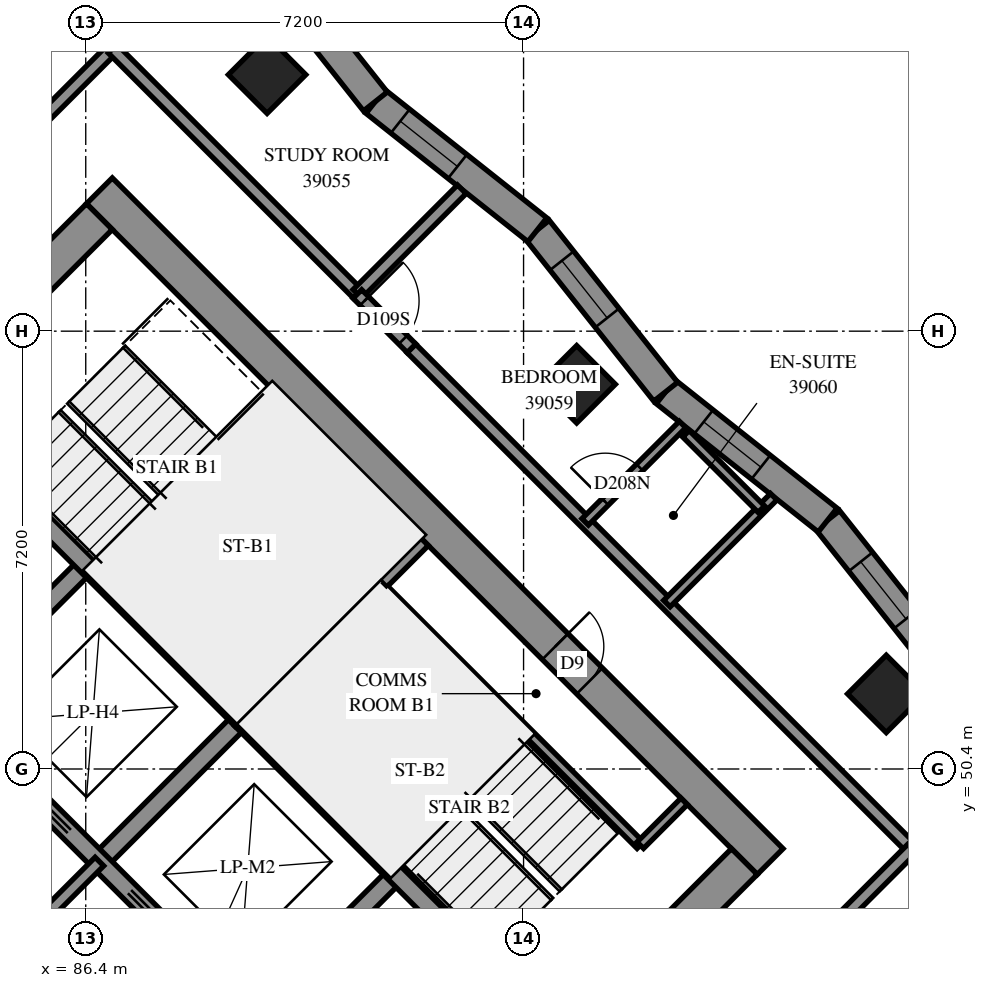
"""IFC4 building model, lengths in metres.
Left out: names, types, materials, properties, quantities, classifications, styles, units other than length and angle.
Written with IfcOpenShell. Run it as: python <this file> out.ifc"""

import sys

from ifc_helpers import new_model, si_unit, direction, frame, frame_2d, origin, origin_2d, place, context, subcontext, project, spatial, polyline, rectangle, outline, extrude, element, fill, save


model = new_model("IFC4")
c1 = context("Model", 3, precision=1e-05, world=origin(), true_north=direction((0.0, 1.0)))
c2 = subcontext(c1, "Body", "Model", "MODEL_VIEW")
j1 = project(units=[si_unit("LENGTHUNIT", "METRE"), si_unit("PLANEANGLEUNIT", "RADIAN")], contexts=[c1])
p1 = place(None, origin())
s1 = spatial("IfcSite", under=j1, at=p1, CompositionType="ELEMENT")
p2 = place(p1, origin())
s2 = spatial("IfcBuilding", under=s1, at=p2, CompositionType="ELEMENT")
p3 = place(p2, frame((0.0, 0.0, 145.6)))
s3 = spatial("IfcBuildingStorey", under=s2, at=p3, CompositionType="ELEMENT", Elevation=145.6)
for number, where, z_axis, x_axis in (
    (1, (89.382, 61.818, 0.0), (0.0, 0.0, 1.0), (0.707, -0.707, 0.0)),
    (2, (94.474, 56.727, 0.0), (0.0, 0.0, 1.0), (0.707, -0.707, 0.0)),
    (3, (99.565, 51.635, 0.0), (0.0, 0.0, 1.0), (0.707, -0.707, 0.0)),
):
    element("IfcColumn", number, at=place(p3, frame(where, z_axis=z_axis, x_axis=x_axis)), inside=s3, PredefinedType="COLUMN", context=c2, shape_type="SweptSolid", body=[
        extrude(rectangle(XDim=0.9, YDim=0.9, at=origin_2d()), origin(), (0.0, 0.0, 1.0), 3.1),
    ])
p4 = place(p3, frame((76.018, 49.302, -0.3), z_axis=(0.0, 0.0, 1.0), x_axis=(0.7071067812, -0.7071067812, 0.0)))
e4 = element("IfcWall", 4, at=p4, inside=s3, PredefinedType="SHEAR", context=c2, shape_type="SweptSolid", body=[
    extrude(rectangle(XDim=15.6, YDim=0.6, at=frame_2d((7.8, 0.0))), origin(), (0.0, 0.0, 1.0), 2.7),
])
p5 = place(p3, frame((86.625, 59.908, -0.3), z_axis=(0.0, 0.0, 1.0), x_axis=(0.7071067812, -0.7071067812, 0.0)))
e5 = element("IfcWall", 5, at=p5, inside=s3, PredefinedType="SHEAR", context=c2, shape_type="SweptSolid", body=[
    extrude(rectangle(XDim=15.6, YDim=0.6, at=frame_2d((7.8, 0.0))), origin(), (0.0, 0.0, 1.0), 2.7),
])
p6 = place(p5, frame((10.6, 0.0, 0.3)))
e6 = element("IfcOpeningElement", 6, at=p6, cuts=e5, PredefinedType="OPENING", context=c2, shape_type="SweptSolid", body=[
    extrude(rectangle(XDim=0.8, YDim=2.1, at=frame_2d((0.4, 1.05))), frame((0.0, 0.31, 0.0), z_axis=(0.0, -1.0, 0.0), x_axis=(1.0, 0.0, 0.0)), (0.0, 0.0, 1.0), 0.62),
])
p7 = place(p3, frame((76.442, 49.302, -0.3), z_axis=(0.0, 0.0, 1.0), x_axis=(0.7071067812, 0.7071067812, 0.0)))
e7 = element("IfcWall", 7, at=p7, inside=s3, PredefinedType="SHEAR", context=c2, shape_type="SweptSolid", body=[
    extrude(rectangle(XDim=14.4, YDim=0.6, at=frame_2d((7.2, 0.0))), origin(), (0.0, 0.0, 1.0), 2.7),
])
p8 = place(p7, frame((4.55, 0.0, 0.3)))
e8 = element("IfcOpeningElement", 8, at=p8, cuts=e7, PredefinedType="OPENING", context=c2, shape_type="SweptSolid", body=[
    extrude(rectangle(XDim=1.1, YDim=2.1, at=frame_2d((0.55, 1.05))), frame((0.0, 0.31, 0.0), z_axis=(0.0, -1.0, 0.0), x_axis=(1.0, 0.0, 0.0)), (0.0, 0.0, 1.0), 0.62),
])
p9 = place(p7, frame((11.35, 0.0, 0.3)))
e9 = element("IfcOpeningElement", 9, at=p9, cuts=e7, PredefinedType="OPENING", context=c2, shape_type="SweptSolid", body=[
    extrude(rectangle(XDim=1.1, YDim=2.1, at=frame_2d((0.55, 1.05))), frame((0.0, 0.31, 0.0), z_axis=(0.0, -1.0, 0.0), x_axis=(1.0, 0.0, 0.0)), (0.0, 0.0, 1.0), 0.62),
])
p10 = place(p3, frame((87.049, 38.695, -0.3), z_axis=(0.0, 0.0, 1.0), x_axis=(0.7071067812, 0.7071067812, 0.0)))
e10 = element("IfcWall", 10, at=p10, inside=s3, PredefinedType="SHEAR", context=c2, shape_type="SweptSolid", body=[
    extrude(rectangle(XDim=14.4, YDim=0.6, at=frame_2d((7.2, 0.0))), origin(), (0.0, 0.0, 1.0), 2.7),
])
p11 = place(p10, frame((4.55, 0.0, 0.3)))
e11 = element("IfcOpeningElement", 11, at=p11, cuts=e10, PredefinedType="OPENING", context=c2, shape_type="SweptSolid", body=[
    extrude(rectangle(XDim=1.1, YDim=2.1, at=frame_2d((0.55, 1.05))), frame((0.0, 0.31, 0.0), z_axis=(0.0, -1.0, 0.0), x_axis=(1.0, 0.0, 0.0)), (0.0, 0.0, 1.0), 0.62),
])
p12 = place(p10, frame((11.35, 0.0, 0.3)))
e12 = element("IfcOpeningElement", 12, at=p12, cuts=e10, PredefinedType="OPENING", context=c2, shape_type="SweptSolid", body=[
    extrude(rectangle(XDim=1.1, YDim=2.1, at=frame_2d((0.55, 1.05))), frame((0.0, 0.31, 0.0), z_axis=(0.0, -1.0, 0.0), x_axis=(1.0, 0.0, 0.0)), (0.0, 0.0, 1.0), 0.62),
])
p13 = place(p3, frame((84.079, 51.423, 0.0), z_axis=(0.0, 0.0, 1.0), x_axis=(0.7071219326, 0.7070916295, 0.0)))
e13 = element("IfcWall", 13, at=p13, inside=s3, PredefinedType="SOLIDWALL", context=c2, shape_type="SweptSolid", body=[
    extrude(rectangle(XDim=3.3, YDim=0.3, at=frame_2d((1.65, 0.0))), origin(), (0.0, 0.0, 1.0), 3.1),
])
for number, where, z_axis, x_axis in (
    (14, (86.625, 48.878, 0.0), (0.0, 0.0, 1.0), (0.707, 0.707, 0.0)),
    (15, (89.17, 46.332, 0.0), (0.0, 0.0, 1.0), (0.707, 0.707, 0.0)),
):
    element("IfcWall", number, at=place(p3, frame(where, z_axis=z_axis, x_axis=x_axis)), inside=s3, PredefinedType="SOLIDWALL", context=c2, shape_type="SweptSolid", body=[
        extrude(rectangle(XDim=3.3, YDim=0.3, at=frame_2d((1.65, 0.0))), origin(), (0.0, 0.0, 1.0), 3.1),
    ])
p14 = place(p3, frame((78.988, 51.423, 0.0), z_axis=(0.0, 0.0, 1.0), x_axis=(0.7071067812, -0.7071067812, 0.0)))
e16 = element("IfcWall", 16, at=p14, inside=s3, PredefinedType="SOLIDWALL", context=c2, shape_type="SweptSolid", body=[
    extrude(rectangle(XDim=14.4, YDim=0.3, at=frame_2d((7.2, 0.0))), origin(), (0.0, 0.0, 1.0), 3.1),
])
p15 = place(p14, frame((1.35, 0.0, 0.0)))
e17 = element("IfcOpeningElement", 17, at=p15, cuts=e16, PredefinedType="OPENING", context=c2, shape_type="SweptSolid", body=[
    extrude(rectangle(XDim=0.9, YDim=2.1, at=frame_2d((0.45, 1.05))), frame((0.0, 0.16, 0.0), z_axis=(0.0, -1.0, 0.0), x_axis=(1.0, 0.0, 0.0)), (0.0, 0.0, 1.0), 0.32),
])
p16 = place(p14, frame((4.95, 0.0, 0.0)))
e18 = element("IfcOpeningElement", 18, at=p16, cuts=e16, PredefinedType="OPENING", context=c2, shape_type="SweptSolid", body=[
    extrude(rectangle(XDim=0.9, YDim=2.1, at=frame_2d((0.45, 1.05))), frame((0.0, 0.16, 0.0), z_axis=(0.0, -1.0, 0.0), x_axis=(1.0, 0.0, 0.0)), (0.0, 0.0, 1.0), 0.32),
])
p17 = place(p14, frame((8.55, 0.0, 0.0)))
e19 = element("IfcOpeningElement", 19, at=p17, cuts=e16, PredefinedType="OPENING", context=c2, shape_type="SweptSolid", body=[
    extrude(rectangle(XDim=0.9, YDim=2.1, at=frame_2d((0.45, 1.05))), frame((0.0, 0.16, 0.0), z_axis=(0.0, -1.0, 0.0), x_axis=(1.0, 0.0, 0.0)), (0.0, 0.0, 1.0), 0.32),
])
p18 = place(p14, frame((12.05, 0.0, 0.0)))
e20 = element("IfcOpeningElement", 20, at=p18, cuts=e16, PredefinedType="OPENING", context=c2, shape_type="SweptSolid", body=[
    extrude(rectangle(XDim=1.1, YDim=2.1, at=frame_2d((0.55, 1.05))), frame((0.0, 0.16, 0.0), z_axis=(0.0, -1.0, 0.0), x_axis=(1.0, 0.0, 0.0)), (0.0, 0.0, 1.0), 0.32),
])
p19 = place(p3, frame((81.534, 53.969, 0.0), z_axis=(0.0, 0.0, 1.0), x_axis=(0.707103309, -0.7071102534, 0.0)))
e21 = element("IfcWall", 21, at=p19, inside=s3, PredefinedType="SOLIDWALL", context=c2, shape_type="SweptSolid", body=[
    extrude(rectangle(XDim=14.4, YDim=0.3, at=frame_2d((7.2, 0.0))), origin(), (0.0, 0.0, 1.0), 3.1),
])
p20 = place(p19, frame((1.25, 0.0, 0.0)))
e22 = element("IfcOpeningElement", 22, at=p20, cuts=e21, PredefinedType="OPENING", context=c2, shape_type="SweptSolid", body=[
    extrude(rectangle(XDim=1.1, YDim=2.1, at=frame_2d((0.55, 1.05))), frame((0.0, 0.16, 0.0), z_axis=(0.0, -1.0, 0.0), x_axis=(1.0, 0.0, 0.0)), (0.0, 0.0, 1.0), 0.32),
])
p21 = place(p19, frame((4.85, 0.0, 0.0)))
e23 = element("IfcOpeningElement", 23, at=p21, cuts=e21, PredefinedType="OPENING", context=c2, shape_type="SweptSolid", body=[
    extrude(rectangle(XDim=1.1, YDim=2.1, at=frame_2d((0.55, 1.05))), frame((0.0, 0.16, 0.0), z_axis=(0.0, -1.0, 0.0), x_axis=(1.0, 0.0, 0.0)), (0.0, 0.0, 1.0), 0.32),
])
p22 = place(p19, frame((8.45, 0.0, 0.0)))
e24 = element("IfcOpeningElement", 24, at=p22, cuts=e21, PredefinedType="OPENING", context=c2, shape_type="SweptSolid", body=[
    extrude(rectangle(XDim=1.1, YDim=2.1, at=frame_2d((0.55, 1.05))), frame((0.0, 0.16, 0.0), z_axis=(0.0, -1.0, 0.0), x_axis=(1.0, 0.0, 0.0)), (0.0, 0.0, 1.0), 0.32),
])
p23 = place(p19, frame((12.05, 0.0, 0.0)))
e25 = element("IfcOpeningElement", 25, at=p23, cuts=e21, PredefinedType="OPENING", context=c2, shape_type="SweptSolid", body=[
    extrude(rectangle(XDim=1.1, YDim=2.1, at=frame_2d((0.55, 1.05))), frame((0.0, 0.16, 0.0), z_axis=(0.0, -1.0, 0.0), x_axis=(1.0, 0.0, 0.0)), (0.0, 0.0, 1.0), 0.32),
])
for number, where, z_axis, x_axis in (
    (26, (83.867, 56.302, 0.0), (0.0, 0.0, 1.0), (0.707, -0.707, 0.0)),
    (27, (88.958, 51.211, 0.0), (0.0, 0.0, 1.0), (0.707, -0.707, 0.0)),
):
    element("IfcWall", number, at=place(p3, frame(where, z_axis=z_axis, x_axis=x_axis)), inside=s3, PredefinedType="SOLIDWALL", context=c2, shape_type="SweptSolid", body=[
        extrude(rectangle(XDim=7.2, YDim=0.3, at=frame_2d((3.6, 0.0))), origin(), (0.0, 0.0, 1.0), 3.1),
    ])
p24 = place(p3, frame((88.958, 51.211, 0.0), z_axis=(0.0, 0.0, 1.0), x_axis=(0.7071067812, 0.7071067812, 0.0)))
e28 = element("IfcWall", 28, at=p24, inside=s3, PredefinedType="SOLIDWALL", context=c2, shape_type="SweptSolid", body=[
    extrude(rectangle(XDim=4.2, YDim=0.3, at=frame_2d((2.1, 0.0))), origin(), (0.0, 0.0, 1.0), 3.1),
])
p25 = place(p3, frame((100.711, 51.83, 0.0), z_axis=(0.0, 0.0, 1.0), x_axis=(-0.6210601514, 0.7837629032, 0.0)))
e29 = element("IfcWall", 29, at=p25, inside=s3, PredefinedType="SOLIDWALL", context=c2, shape_type="SweptSolid", body=[
    extrude(outline(polyline([(0.029, -0.25), (3.427, -0.25), (3.369, 0.25), (-0.029, 0.25), (0.029, -0.25)])), origin(), (0.0, 0.0, 1.0), 3.1),
])
p26 = place(p25, frame((1.323, 0.0, 0.45)))
e30 = element("IfcOpeningElement", 30, at=p26, cuts=e29, PredefinedType="OPENING", context=c2, shape_type="SweptSolid", body=[
    extrude(rectangle(XDim=1.2, YDim=2.5, at=frame_2d((0.6, 1.25))), frame((0.0, 0.26, 0.0), z_axis=(0.0, -1.0, 0.0), x_axis=(1.0, 0.0, 0.0)), (0.0, 0.0, 1.0), 0.52),
])
p27 = place(p3, frame((98.601, 54.493, 0.0), z_axis=(0.0, 0.0, 1.0), x_axis=(-0.7837629032, 0.6210601514, 0.0)))
e31 = element("IfcWall", 31, at=p27, inside=s3, PredefinedType="SOLIDWALL", context=c2, shape_type="SweptSolid", body=[
    extrude(outline(polyline([(-0.029, -0.25), (3.369, -0.25), (3.427, 0.25), (0.029, 0.25), (-0.029, -0.25)])), origin(), (0.0, 0.0, 1.0), 3.1),
])
p28 = place(p27, frame((1.401, 0.0, 0.45)))
e32 = element("IfcOpeningElement", 32, at=p28, cuts=e31, PredefinedType="OPENING", context=c2, shape_type="SweptSolid", body=[
    extrude(rectangle(XDim=1.2, YDim=2.5, at=frame_2d((0.6, 1.25))), frame((0.0, 0.26, 0.0), z_axis=(0.0, -1.0, 0.0), x_axis=(1.0, 0.0, 0.0)), (0.0, 0.0, 1.0), 0.52),
])
p29 = place(p3, frame((95.937, 56.604, 0.0), z_axis=(0.0, 0.0, 1.0), x_axis=(-0.6210601514, 0.7837629032, 0.0)))
e33 = element("IfcWall", 33, at=p29, inside=s3, PredefinedType="SOLIDWALL", context=c2, shape_type="SweptSolid", body=[
    extrude(outline(polyline([(0.029, -0.25), (3.427, -0.25), (3.369, 0.25), (-0.029, 0.25), (0.029, -0.25)])), origin(), (0.0, 0.0, 1.0), 3.1),
])
p30 = place(p29, frame((1.549, 0.0, 0.45)))
e34 = element("IfcOpeningElement", 34, at=p30, cuts=e33, PredefinedType="OPENING", context=c2, shape_type="SweptSolid", body=[
    extrude(rectangle(XDim=1.2, YDim=2.5, at=frame_2d((0.6, 1.25))), frame((0.0, 0.26, 0.0), z_axis=(0.0, -1.0, 0.0), x_axis=(1.0, 0.0, 0.0)), (0.0, 0.0, 1.0), 0.52),
])
p31 = place(p3, frame((93.827, 59.267, 0.0), z_axis=(0.0, 0.0, 1.0), x_axis=(-0.7837772273, 0.6210420742, 0.0)))
e35 = element("IfcWall", 35, at=p31, inside=s3, PredefinedType="SOLIDWALL", context=c2, shape_type="SweptSolid", body=[
    extrude(outline(polyline([(-0.029, -0.25), (3.369, -0.25), (3.427, 0.25), (0.029, 0.25), (-0.029, -0.25)])), origin(), (0.0, 0.0, 1.0), 3.1),
])
p32 = place(p31, frame((1.677, 0.0, 0.45)))
e36 = element("IfcOpeningElement", 36, at=p32, cuts=e35, PredefinedType="OPENING", context=c2, shape_type="SweptSolid", body=[
    extrude(rectangle(XDim=1.2, YDim=2.5, at=frame_2d((0.6, 1.25))), frame((0.0, 0.26, 0.0), z_axis=(0.0, -1.0, 0.0), x_axis=(1.0, 0.0, 0.0)), (0.0, 0.0, 1.0), 0.52),
])
p33 = place(p3, frame((91.163, 61.378, 0.0), z_axis=(0.0, 0.0, 1.0), x_axis=(-0.6210277503, 0.783788577, 0.0)))
e37 = element("IfcWall", 37, at=p33, inside=s3, PredefinedType="SOLIDWALL", context=c2, shape_type="SweptSolid", body=[
    extrude(outline(polyline([(0.029, -0.25), (3.427, -0.25), (3.369, 0.25), (-0.029, 0.25), (0.029, -0.25)])), origin(), (0.0, 0.0, 1.0), 3.1),
])
p34 = place(p33, frame((1.775, 0.0, 0.45)))
e38 = element("IfcOpeningElement", 38, at=p34, cuts=e37, PredefinedType="OPENING", context=c2, shape_type="SweptSolid", body=[
    extrude(rectangle(XDim=1.2, YDim=2.5, at=frame_2d((0.6, 1.25))), frame((0.0, 0.26, 0.0), z_axis=(0.0, -1.0, 0.0), x_axis=(1.0, 0.0, 0.0)), (0.0, 0.0, 1.0), 0.52),
])
p35 = place(p3, frame((91.313, 53.354, 0.0), z_axis=(0.0, 0.0, 1.0), x_axis=(0.7071067812, -0.7071067812, 0.0)))
e39 = element("IfcWall", 39, at=p35, inside=s3, PredefinedType="PARTITIONING", context=c2, shape_type="SweptSolid", body=[
    extrude(rectangle(XDim=5.95, YDim=0.15, at=frame_2d((2.975, 0.0))), origin(), (0.0, 0.0, 1.0), 3.1),
])
p36 = place(p3, frame((95.52, 49.146, 0.0), z_axis=(0.0, 0.0, 1.0), x_axis=(0.7071067812, 0.7071067812, 0.0)))
e40 = element("IfcWall", 40, at=p36, inside=s3, PredefinedType="PARTITIONING", context=c2, shape_type="SweptSolid", body=[
    extrude(rectangle(XDim=1.02, YDim=0.15, at=frame_2d((0.51, 0.0))), origin(), (0.0, 0.0, 1.0), 3.1),
])
p37 = place(p3, frame((84.079, 46.332, 0.0), z_axis=(0.0, 0.0, 1.0), x_axis=(0.7071067812, 0.7071067812, 0.0)))
e41 = element("IfcWall", 41, at=p37, inside=s3, PredefinedType="PARTITIONING", context=c2, shape_type="SweptSolid", body=[
    extrude(rectangle(XDim=3.6, YDim=0.2, at=frame_2d((1.8, 0.0))), origin(), (0.0, 0.0, 1.0), 3.1),
])
p38 = place(p3, frame((91.755, 57.317, 0.0), z_axis=(0.0, 0.0, 1.0), x_axis=(0.7071067812, -0.7071067812, 0.0)))
e42 = element("IfcWall", 42, at=p38, inside=s3, PredefinedType="PARTITIONING", context=c2, shape_type="SweptSolid", body=[
    extrude(rectangle(XDim=11.639, YDim=0.2, at=frame_2d((5.819, 0.0))), origin(), (0.0, 0.0, 1.0), 3.1),
])
p39 = place(p3, frame((95.25, 42.232, 0.0), z_axis=(0.0, 0.0, 1.0), x_axis=(0.7071114386, 0.7071021238, 0.0)))
e43 = element("IfcWall", 43, at=p39, inside=s3, PredefinedType="PARTITIONING", context=c2, shape_type="SweptSolid", body=[
    extrude(rectangle(XDim=10.736, YDim=0.2, at=frame_2d((5.368, 0.0))), origin(), (0.0, 0.0, 1.0), 3.1),
])
p40 = place(p3, frame((80.899, 58.427, 0.0), z_axis=(0.0, 0.0, 1.0), x_axis=(0.7071067812, 0.7071067812, 0.0)))
e44 = element("IfcWall", 44, at=p40, inside=s3, PredefinedType="PARTITIONING", context=c2, shape_type="SweptSolid", body=[
    extrude(rectangle(XDim=9.276, YDim=0.2, at=frame_2d((4.638, 0.0))), origin(), (0.0, 0.0, 1.0), 3.1),
])
p41 = place(p3, frame((94.19, 43.292, 0.0), z_axis=(0.0, 0.0, 1.0), x_axis=(0.7071067812, 0.7071067812, 0.0)))
e45 = element("IfcWall", 45, at=p41, inside=s3, PredefinedType="PARTITIONING", context=c2, shape_type="SweptSolid", body=[
    extrude(rectangle(XDim=8.2, YDim=0.2, at=frame_2d((4.1, 0.0))), origin(), (0.0, 0.0, 1.0), 3.1),
])
p42 = place(p41, frame((0.251, 0.0, 0.0)))
e46 = element("IfcOpeningElement", 46, at=p42, cuts=e45, PredefinedType="OPENING", context=c2, shape_type="SweptSolid", body=[
    extrude(rectangle(XDim=1.0, YDim=2.1, at=frame_2d((0.5, 1.05))), frame((0.0, 0.11, 0.0), z_axis=(0.0, -1.0, 0.0), x_axis=(1.0, 0.0, 0.0)), (0.0, 0.0, 1.0), 0.22),
])
p43 = place(p3, frame((81.038, 56.444, 0.0), z_axis=(0.0, 0.0, 1.0), x_axis=(0.7071067812, 0.7071067812, 0.0)))
e47 = element("IfcWall", 47, at=p43, inside=s3, PredefinedType="PARTITIONING", context=c2, shape_type="SweptSolid", body=[
    extrude(rectangle(XDim=8.2, YDim=0.2, at=frame_2d((4.1, 0.0))), origin(), (0.0, 0.0, 1.0), 3.1),
])
p44 = place(p43, frame((0.66, 0.0, 0.0)))
e48 = element("IfcOpeningElement", 48, at=p44, cuts=e47, PredefinedType="OPENING", context=c2, shape_type="SweptSolid", body=[
    extrude(rectangle(XDim=1.0, YDim=2.1, at=frame_2d((0.5, 1.05))), frame((0.0, 0.11, 0.0), z_axis=(0.0, -1.0, 0.0), x_axis=(1.0, 0.0, 0.0)), (0.0, 0.0, 1.0), 0.22),
])
p45 = place(p3, frame((86.841, 62.245, 0.0), z_axis=(0.0, 0.0, 1.0), x_axis=(0.7071067812, -0.7071067812, 0.0)))
e49 = element("IfcWall", 49, at=p45, inside=s3, PredefinedType="PARTITIONING", context=c2, shape_type="SweptSolid", body=[
    extrude(rectangle(XDim=5.699, YDim=0.2, at=frame_2d((2.85, 0.0))), origin(), (0.0, 0.0, 1.0), 3.1),
])
p46 = place(p3, frame((95.957, 53.121, 0.0), z_axis=(0.0, 0.0, 1.0), x_axis=(0.7071067812, 0.7071067812, 0.0)))
e50 = element("IfcWall", 50, at=p46, inside=s3, PredefinedType="PARTITIONING", context=c2, shape_type="SweptSolid", body=[
    extrude(rectangle(XDim=2.484, YDim=0.15, at=frame_2d((1.242, 0.0))), origin(), (0.0, 0.0, 1.0), 3.1),
])
p47 = place(p3, frame((90.867, 58.213, 0.0), z_axis=(0.0, 0.0, 1.0), x_axis=(0.7066128767, 0.7076003409, 0.0)))
e51 = element("IfcWall", 51, at=p47, inside=s3, PredefinedType="PARTITIONING", context=c2, shape_type="SweptSolid", body=[
    extrude(rectangle(XDim=2.43, YDim=0.2, at=frame_2d((1.215, 0.0))), origin(), (0.0, 0.0, 1.0), 3.1),
])
p48 = place(p3, frame((94.614, 54.464, 0.0), z_axis=(0.0, 0.0, 1.0), x_axis=(0.7070846955, 0.7071288662, 0.0)))
e52 = element("IfcWall", 52, at=p48, inside=s3, PredefinedType="PARTITIONING", context=c2, shape_type="SweptSolid", body=[
    extrude(rectangle(XDim=2.264, YDim=0.15, at=frame_2d((1.132, 0.0))), origin(), (0.0, 0.0, 1.0), 3.1),
])
p49 = place(p48, frame((0.466, 0.0, 0.0)))
e53 = element("IfcOpeningElement", 53, at=p49, cuts=e52, PredefinedType="OPENING", context=c2, shape_type="SweptSolid", body=[
    extrude(rectangle(XDim=0.8, YDim=2.1, at=frame_2d((0.4, 1.05))), frame((0.0, 0.085, 0.0), z_axis=(0.0, -1.0, 0.0), x_axis=(1.0, 0.0, 0.0)), (0.0, 0.0, 1.0), 0.17),
])
p50 = place(p3, frame((96.271, 55.913, 0.0), z_axis=(0.0, 0.0, 1.0), x_axis=(0.7071067812, -0.7071067812, 0.0)))
e54 = element("IfcWall", 54, at=p50, inside=s3, PredefinedType="PARTITIONING", context=c2, shape_type="SweptSolid", body=[
    extrude(rectangle(XDim=1.754, YDim=0.15, at=frame_2d((0.877, 0.0))), origin(), (0.0, 0.0, 1.0), 3.1),
])
p51 = place(p3, frame((90.867, 58.211, 0.0), z_axis=(0.0, 0.0, 1.0), x_axis=(0.706312726, -0.7078999456, 0.0)))
e55 = element("IfcWall", 55, at=p51, inside=s3, PredefinedType="PARTITIONING", context=c2, shape_type="SweptSolid", body=[
    extrude(rectangle(XDim=1.26, YDim=0.2, at=frame_2d((0.63, 0.0))), origin(), (0.0, 0.0, 1.0), 3.1),
])
p52 = place(p51, frame((0.162, 0.0, 0.0)))
e56 = element("IfcOpeningElement", 56, at=p52, cuts=e55, PredefinedType="OPENING", context=c2, shape_type="SweptSolid", body=[
    extrude(rectangle(XDim=0.9, YDim=2.1, at=frame_2d((0.45, 1.05))), frame((0.0, 0.11, 0.0), z_axis=(0.0, -1.0, 0.0), x_axis=(1.0, 0.0, 0.0)), (0.0, 0.0, 1.0), 0.22),
])
p53 = place(p26, origin())
e57 = element("IfcWindow", 57, at=p53, inside=s3, PartitioningType="SINGLE_PANEL", PredefinedType="WINDOW", context=c2, shape_type="SweptSolid", body=[
    extrude(rectangle(XDim=1.2, YDim=2.5, at=frame_2d((0.6, 1.25))), frame((0.0, 0.18, 0.0), z_axis=(0.0, -1.0, 0.0), x_axis=(1.0, 0.0, 0.0)), (0.0, 0.0, 1.0), 0.06),
])
fill(e30, e57)
p54 = place(p28, origin())
e58 = element("IfcWindow", 58, at=p54, inside=s3, PartitioningType="SINGLE_PANEL", PredefinedType="WINDOW", context=c2, shape_type="SweptSolid", body=[
    extrude(rectangle(XDim=1.2, YDim=2.5, at=frame_2d((0.6, 1.25))), frame((0.0, 0.18, 0.0), z_axis=(0.0, -1.0, 0.0), x_axis=(1.0, 0.0, 0.0)), (0.0, 0.0, 1.0), 0.06),
])
fill(e32, e58)
p55 = place(p30, origin())
e59 = element("IfcWindow", 59, at=p55, inside=s3, PartitioningType="SINGLE_PANEL", PredefinedType="WINDOW", context=c2, shape_type="SweptSolid", body=[
    extrude(rectangle(XDim=1.2, YDim=2.5, at=frame_2d((0.6, 1.25))), frame((0.0, 0.18, 0.0), z_axis=(0.0, -1.0, 0.0), x_axis=(1.0, 0.0, 0.0)), (0.0, 0.0, 1.0), 0.06),
])
fill(e34, e59)
p56 = place(p32, origin())
e60 = element("IfcWindow", 60, at=p56, inside=s3, PartitioningType="SINGLE_PANEL", PredefinedType="WINDOW", context=c2, shape_type="SweptSolid", body=[
    extrude(rectangle(XDim=1.2, YDim=2.5, at=frame_2d((0.6, 1.25))), frame((0.0, 0.18, 0.0), z_axis=(0.0, -1.0, 0.0), x_axis=(1.0, 0.0, 0.0)), (0.0, 0.0, 1.0), 0.06),
])
fill(e36, e60)
p57 = place(p6, origin())
e61 = element("IfcDoor", 61, at=p57, inside=s3, OperationType="SINGLE_SWING_RIGHT", PredefinedType="DOOR", context=c2, shape_type="SweptSolid", body=[
    extrude(rectangle(XDim=0.8, YDim=2.1, at=frame_2d((0.4, 1.05))), frame((0.0, 0.025, 0.0), z_axis=(0.0, -1.0, 0.0), x_axis=(1.0, 0.0, 0.0)), (0.0, 0.0, 1.0), 0.05),
])
fill(e6, e61)
p58 = place(p52, origin())
e62 = element("IfcDoor", 62, at=p58, inside=s3, OperationType="SINGLE_SWING_RIGHT", PredefinedType="DOOR", context=c2, shape_type="SweptSolid", body=[
    extrude(rectangle(XDim=0.9, YDim=2.1, at=frame_2d((0.45, 1.05))), frame((0.0, 0.025, 0.0), z_axis=(0.0, -1.0, 0.0), x_axis=(1.0, 0.0, 0.0)), (0.0, 0.0, 1.0), 0.05),
])
fill(e56, e62)
p59 = place(p49, origin())
e63 = element("IfcDoor", 63, at=p59, inside=s3, OperationType="SINGLE_SWING_RIGHT", PredefinedType="DOOR", context=c2, shape_type="SweptSolid", body=[
    extrude(rectangle(XDim=0.8, YDim=2.1, at=frame_2d((0.4, 1.05))), frame((0.0, 0.025, 0.0), z_axis=(0.0, -1.0, 0.0), x_axis=(1.0, 0.0, 0.0)), (0.0, 0.0, 1.0), 0.05),
])
fill(e53, e63)
save(model, sys.argv[1])
